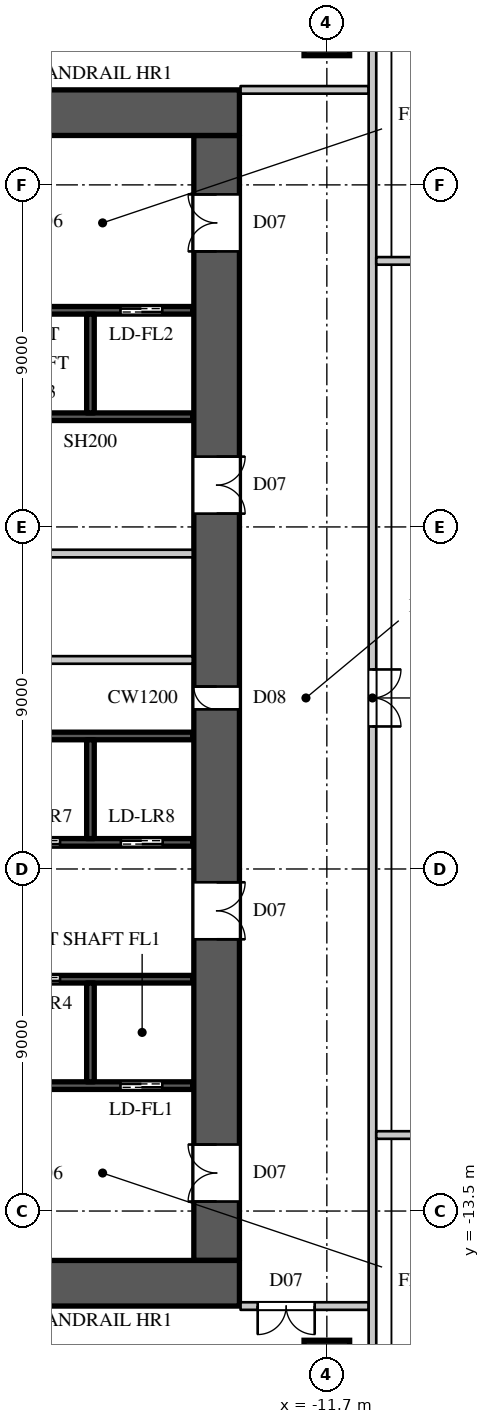
"""IFC4 building model, lengths in metres.
Left out: names, types, materials, properties, quantities, classifications, styles, units other than length and angle.
Written with IfcOpenShell. Run it as: python <this file> out.ifc"""

import sys

from ifc_helpers import new_model, si_unit, direction, frame, frame_2d, origin, origin_2d, place, context, subcontext, project, spatial, rectangle, circle, extrude, element, fill, save


model = new_model("IFC4")
c1 = context("Model", 3, precision=1e-05, world=origin(), true_north=direction((0.0, 1.0)))
c2 = subcontext(c1, "Body", "Model", "MODEL_VIEW")
j1 = project(units=[si_unit("LENGTHUNIT", "METRE"), si_unit("PLANEANGLEUNIT", "RADIAN")], contexts=[c1])
p1 = place(None, origin())
s1 = spatial("IfcSite", under=j1, at=p1, CompositionType="ELEMENT")
p2 = place(p1, origin())
s2 = spatial("IfcBuilding", under=s1, at=p2, CompositionType="ELEMENT")
p3 = place(p2, frame((0.0, 0.0, 36.0)))
s3 = spatial("IfcBuildingStorey", under=s2, at=p3, CompositionType="ELEMENT", Elevation=36.0)
for number, where, z_axis, x_axis in (
    (1, (-11.7, -17.5, 0.0), (0.0, 0.0, 1.0), (1.0, 0.0, 0.0)),
    (2, (-11.7, 17.5, 0.0), (0.0, 0.0, 1.0), (1.0, 0.0, 0.0)),
):
    element("IfcColumn", number, at=place(p3, frame(where, z_axis=z_axis, x_axis=x_axis)), inside=s3, PredefinedType="COLUMN", context=c2, shape_type="SweptSolid", body=[
        extrude(circle(Radius=0.6, at=origin_2d()), origin(), (0.0, 0.0, 1.0), 8.0),
    ])
for number, where, z_axis, x_axis in (
    (3, (-30.0, 15.4, 0.0), (0.0, 0.0, 1.0), (1.0, 0.0, 0.0)),
    (4, (-30.0, -15.4, 0.0), (0.0, 0.0, 1.0), (1.0, 0.0, 0.0)),
):
    element("IfcWall", number, at=place(p3, frame(where, z_axis=z_axis, x_axis=x_axis)), inside=s3, PredefinedType="SHEAR", context=c2, shape_type="SweptSolid", body=[
        extrude(rectangle(XDim=16.0, YDim=1.2, at=frame_2d((8.0, 0.0))), origin(), (0.0, 0.0, 1.0), 8.0),
    ])
p4 = place(p3, frame((-14.6, -14.8, 0.0), z_axis=(0.0, 0.0, 1.0), x_axis=(0.0, 1.0, 0.0)))
e5 = element("IfcWall", 5, at=p4, inside=s3, PredefinedType="SHEAR", context=c2, shape_type="SweptSolid", body=[
    extrude(rectangle(XDim=29.6, YDim=1.2, at=frame_2d((14.8, 0.0))), origin(), (0.0, 0.0, 1.0), 8.0),
])
p5 = place(p4, frame((1.55, 0.0, 0.0)))
e6 = element("IfcOpeningElement", 6, at=p5, cuts=e5, PredefinedType="OPENING", context=c2, shape_type="SweptSolid", body=[
    extrude(rectangle(XDim=1.5, YDim=2.4, at=frame_2d((0.75, 1.2))), frame((0.0, 0.61, 0.0), z_axis=(0.0, -1.0, 0.0), x_axis=(1.0, 0.0, 0.0)), (0.0, 0.0, 1.0), 1.22),
])
p6 = place(p4, frame((26.55, 0.0, 0.0)))
e7 = element("IfcOpeningElement", 7, at=p6, cuts=e5, PredefinedType="OPENING", context=c2, shape_type="SweptSolid", body=[
    extrude(rectangle(XDim=1.5, YDim=2.4, at=frame_2d((0.75, 1.2))), frame((0.0, 0.61, 0.0), z_axis=(0.0, -1.0, 0.0), x_axis=(1.0, 0.0, 0.0)), (0.0, 0.0, 1.0), 1.22),
])
p7 = place(p4, frame((8.45, 0.0, 0.0)))
e8 = element("IfcOpeningElement", 8, at=p7, cuts=e5, PredefinedType="OPENING", context=c2, shape_type="SweptSolid", body=[
    extrude(rectangle(XDim=1.5, YDim=2.4, at=frame_2d((0.75, 1.2))), frame((0.0, 0.61, 0.0), z_axis=(0.0, -1.0, 0.0), x_axis=(1.0, 0.0, 0.0)), (0.0, 0.0, 1.0), 1.22),
])
p8 = place(p4, frame((19.65, 0.0, 0.0)))
e9 = element("IfcOpeningElement", 9, at=p8, cuts=e5, PredefinedType="OPENING", context=c2, shape_type="SweptSolid", body=[
    extrude(rectangle(XDim=1.5, YDim=2.4, at=frame_2d((0.75, 1.2))), frame((0.0, 0.61, 0.0), z_axis=(0.0, -1.0, 0.0), x_axis=(1.0, 0.0, 0.0)), (0.0, 0.0, 1.0), 1.22),
])
p9 = place(p4, frame((14.5, 0.0, 0.0)))
e10 = element("IfcOpeningElement", 10, at=p9, cuts=e5, PredefinedType="OPENING", context=c2, shape_type="SweptSolid", body=[
    extrude(rectangle(XDim=0.6, YDim=2.0, at=frame_2d((0.3, 1.0))), frame((0.0, 0.61, 0.0), z_axis=(0.0, -1.0, 0.0), x_axis=(1.0, 0.0, 0.0)), (0.0, 0.0, 1.0), 1.22),
])
p10 = place(p3, frame((-26.1, 3.8, 0.0), z_axis=(0.0, 0.0, 1.0), x_axis=(1.0, 0.0, 0.0)))
e11 = element("IfcWall", 11, at=p10, inside=s3, PredefinedType="PARTITIONING", context=c2, shape_type="SweptSolid", body=[
    extrude(rectangle(XDim=10.87, YDim=0.2, at=frame_2d((5.435, 0.0))), origin(), (0.0, 0.0, 1.0), 7.598),
])
p11 = place(p10, frame((4.95, 0.0, 0.0)))
e12 = element("IfcOpeningElement", 12, at=p11, cuts=e11, PredefinedType="OPENING", context=c2, shape_type="SweptSolid", body=[
    extrude(rectangle(XDim=0.9, YDim=2.2, at=frame_2d((0.45, 1.1))), frame((0.0, 0.11, 0.0), z_axis=(0.0, -1.0, 0.0), x_axis=(1.0, 0.0, 0.0)), (0.0, 0.0, 1.0), 0.22),
])
p12 = place(p3, frame((-13.97, -16.0, 0.0), z_axis=(0.0, 0.0, 1.0), x_axis=(1.0, 0.0, 0.0)))
e13 = element("IfcWall", 13, at=p12, inside=s3, PredefinedType="PARTITIONING", context=c2, shape_type="SweptSolid", body=[
    extrude(rectangle(XDim=3.37, YDim=0.2, at=frame_2d((1.685, 0.0))), origin(), (0.0, 0.0, 1.0), 7.598),
])
p13 = place(p12, frame((0.45, 0.0, 0.0)))
e14 = element("IfcOpeningElement", 14, at=p13, cuts=e13, PredefinedType="OPENING", context=c2, shape_type="SweptSolid", body=[
    extrude(rectangle(XDim=1.5, YDim=2.4, at=frame_2d((0.75, 1.2))), frame((0.0, 0.11, 0.0), z_axis=(0.0, -1.0, 0.0), x_axis=(1.0, 0.0, 0.0)), (0.0, 0.0, 1.0), 0.22),
])
p14 = place(p3, frame((-13.97, 16.0, 0.0), z_axis=(0.0, 0.0, 1.0), x_axis=(1.0, 0.0, 0.0)))
e15 = element("IfcWall", 15, at=p14, inside=s3, PredefinedType="PARTITIONING", context=c2, shape_type="SweptSolid", body=[
    extrude(rectangle(XDim=3.37, YDim=0.2, at=frame_2d((1.685, 0.0))), origin(), (0.0, 0.0, 1.0), 7.598),
])
p15 = place(p3, frame((-10.5, -18.9, 0.0), z_axis=(0.0, 0.0, 1.0), x_axis=(0.0, 1.0, 0.0)))
e16 = element("IfcWall", 16, at=p15, inside=s3, PredefinedType="PARTITIONING", context=c2, shape_type="SweptSolid", body=[
    extrude(rectangle(XDim=37.8, YDim=0.2, at=frame_2d((18.9, 0.0))), origin(), (0.0, 0.0, 1.0), 7.598),
])
p16 = place(p15, frame((18.15, 0.0, 0.0)))
e17 = element("IfcOpeningElement", 17, at=p16, cuts=e16, PredefinedType="OPENING", context=c2, shape_type="SweptSolid", body=[
    extrude(rectangle(XDim=1.5, YDim=2.4, at=frame_2d((0.75, 1.2))), frame((0.0, 0.11, 0.0), z_axis=(0.0, -1.0, 0.0), x_axis=(1.0, 0.0, 0.0)), (0.0, 0.0, 1.0), 0.22),
])
p17 = place(p3, frame((-10.4, -11.5, 0.0), z_axis=(0.0, 0.0, 1.0), x_axis=(1.0, 0.0, 0.0)))
e18 = element("IfcWall", 18, at=p17, inside=s3, PredefinedType="PARTITIONING", context=c2, shape_type="SweptSolid", body=[
    extrude(rectangle(XDim=24.8, YDim=0.2, at=frame_2d((12.4, 0.0))), origin(), (0.0, 0.0, 1.0), 7.598),
])
p18 = place(p17, frame((5.5, 0.0, 0.0)))
e19 = element("IfcOpeningElement", 19, at=p18, cuts=e18, PredefinedType="OPENING", context=c2, shape_type="SweptSolid", body=[
    extrude(rectangle(XDim=1.5, YDim=2.2, at=frame_2d((0.75, 1.1))), frame((0.0, 0.11, 0.0), z_axis=(0.0, -1.0, 0.0), x_axis=(1.0, 0.0, 0.0)), (0.0, 0.0, 1.0), 0.22),
])
p19 = place(p17, frame((17.6, 0.0, 0.0)))
e20 = element("IfcOpeningElement", 20, at=p19, cuts=e18, PredefinedType="OPENING", context=c2, shape_type="SweptSolid", body=[
    extrude(rectangle(XDim=1.5, YDim=2.2, at=frame_2d((0.75, 1.1))), frame((0.0, 0.11, 0.0), z_axis=(0.0, -1.0, 0.0), x_axis=(1.0, 0.0, 0.0)), (0.0, 0.0, 1.0), 0.22),
])
p20 = place(p3, frame((-10.4, 11.5, 0.0), z_axis=(0.0, 0.0, 1.0), x_axis=(1.0, 0.0, 0.0)))
e21 = element("IfcWall", 21, at=p20, inside=s3, PredefinedType="PARTITIONING", context=c2, shape_type="SweptSolid", body=[
    extrude(rectangle(XDim=24.8, YDim=0.2, at=frame_2d((12.4, 0.0))), origin(), (0.0, 0.0, 1.0), 7.598),
])
p21 = place(p20, frame((3.7, 0.0, 0.0)))
e22 = element("IfcOpeningElement", 22, at=p21, cuts=e21, PredefinedType="OPENING", context=c2, shape_type="SweptSolid", body=[
    extrude(rectangle(XDim=1.5, YDim=2.2, at=frame_2d((0.75, 1.1))), frame((0.0, 0.11, 0.0), z_axis=(0.0, -1.0, 0.0), x_axis=(1.0, 0.0, 0.0)), (0.0, 0.0, 1.0), 0.22),
])
p22 = place(p20, frame((11.7, 0.0, 0.0)))
e23 = element("IfcOpeningElement", 23, at=p22, cuts=e21, PredefinedType="OPENING", context=c2, shape_type="SweptSolid", body=[
    extrude(rectangle(XDim=1.5, YDim=2.2, at=frame_2d((0.75, 1.1))), frame((0.0, 0.11, 0.0), z_axis=(0.0, -1.0, 0.0), x_axis=(1.0, 0.0, 0.0)), (0.0, 0.0, 1.0), 0.22),
])
p23 = place(p20, frame((19.9, 0.0, 0.0)))
e24 = element("IfcOpeningElement", 24, at=p23, cuts=e21, PredefinedType="OPENING", context=c2, shape_type="SweptSolid", body=[
    extrude(rectangle(XDim=1.5, YDim=2.2, at=frame_2d((0.75, 1.1))), frame((0.0, 0.11, 0.0), z_axis=(0.0, -1.0, 0.0), x_axis=(1.0, 0.0, 0.0)), (0.0, 0.0, 1.0), 0.22),
])
p24 = place(p3, frame((-26.1, 1.0, 0.0), z_axis=(0.0, 0.0, 1.0), x_axis=(1.0, 0.0, 0.0)))
e25 = element("IfcWall", 25, at=p24, inside=s3, PredefinedType="PARTITIONING", context=c2, shape_type="SweptSolid", body=[
    extrude(rectangle(XDim=10.87, YDim=0.2, at=frame_2d((5.435, 0.0))), origin(), (0.0, 0.0, 1.0), 7.598),
])
p25 = place(p3, frame((-28.77, -7.4, 0.0), z_axis=(0.0, 0.0, 1.0), x_axis=(1.0, 0.0, 0.0)))
e26 = element("IfcWall", 26, at=p25, inside=s3, PredefinedType="SHEAR", context=c2, shape_type="SweptSolid", body=[
    extrude(rectangle(XDim=13.54, YDim=0.2, at=frame_2d((6.77, 0.0))), origin(), (0.0, 0.0, 1.0), 7.598),
])
p26 = place(p25, frame((0.8, 0.0, 0.0)))
e27 = element("IfcOpeningElement", 27, at=p26, cuts=e26, PredefinedType="OPENING", context=c2, shape_type="SweptSolid", body=[
    extrude(rectangle(XDim=1.1, YDim=2.2, at=frame_2d((0.55, 1.1))), frame((0.0, 0.11, 0.0), z_axis=(0.0, -1.0, 0.0), x_axis=(1.0, 0.0, 0.0)), (0.0, 0.0, 1.0), 0.22),
])
p27 = place(p25, frame((3.5, 0.0, 0.0)))
e28 = element("IfcOpeningElement", 28, at=p27, cuts=e26, PredefinedType="OPENING", context=c2, shape_type="SweptSolid", body=[
    extrude(rectangle(XDim=1.1, YDim=2.2, at=frame_2d((0.55, 1.1))), frame((0.0, 0.11, 0.0), z_axis=(0.0, -1.0, 0.0), x_axis=(1.0, 0.0, 0.0)), (0.0, 0.0, 1.0), 0.22),
])
p28 = place(p25, frame((6.2, 0.0, 0.0)))
e29 = element("IfcOpeningElement", 29, at=p28, cuts=e26, PredefinedType="OPENING", context=c2, shape_type="SweptSolid", body=[
    extrude(rectangle(XDim=1.1, YDim=2.2, at=frame_2d((0.55, 1.1))), frame((0.0, 0.11, 0.0), z_axis=(0.0, -1.0, 0.0), x_axis=(1.0, 0.0, 0.0)), (0.0, 0.0, 1.0), 0.22),
])
p29 = place(p25, frame((8.95, 0.0, 0.0)))
e30 = element("IfcOpeningElement", 30, at=p29, cuts=e26, PredefinedType="OPENING", context=c2, shape_type="SweptSolid", body=[
    extrude(rectangle(XDim=1.1, YDim=2.2, at=frame_2d((0.55, 1.1))), frame((0.0, 0.11, 0.0), z_axis=(0.0, -1.0, 0.0), x_axis=(1.0, 0.0, 0.0)), (0.0, 0.0, 1.0), 0.22),
])
p30 = place(p3, frame((-28.77, -3.8, 0.0), z_axis=(0.0, 0.0, 1.0), x_axis=(1.0, 0.0, 0.0)))
e31 = element("IfcWall", 31, at=p30, inside=s3, PredefinedType="SHEAR", context=c2, shape_type="SweptSolid", body=[
    extrude(rectangle(XDim=13.54, YDim=0.2, at=frame_2d((6.77, 0.0))), origin(), (0.0, 0.0, 1.0), 7.598),
])
p31 = place(p30, frame((3.5, 0.0, 0.0)))
e32 = element("IfcOpeningElement", 32, at=p31, cuts=e31, PredefinedType="OPENING", context=c2, shape_type="SweptSolid", body=[
    extrude(rectangle(XDim=1.1, YDim=2.2, at=frame_2d((0.55, 1.1))), frame((0.0, 0.11, 0.0), z_axis=(0.0, -1.0, 0.0), x_axis=(1.0, 0.0, 0.0)), (0.0, 0.0, 1.0), 0.22),
])
p32 = place(p30, frame((6.2, 0.0, 0.0)))
e33 = element("IfcOpeningElement", 33, at=p32, cuts=e31, PredefinedType="OPENING", context=c2, shape_type="SweptSolid", body=[
    extrude(rectangle(XDim=1.1, YDim=2.2, at=frame_2d((0.55, 1.1))), frame((0.0, 0.11, 0.0), z_axis=(0.0, -1.0, 0.0), x_axis=(1.0, 0.0, 0.0)), (0.0, 0.0, 1.0), 0.22),
])
p33 = place(p30, frame((8.95, 0.0, 0.0)))
e34 = element("IfcOpeningElement", 34, at=p33, cuts=e31, PredefinedType="OPENING", context=c2, shape_type="SweptSolid", body=[
    extrude(rectangle(XDim=1.1, YDim=2.2, at=frame_2d((0.55, 1.1))), frame((0.0, 0.11, 0.0), z_axis=(0.0, -1.0, 0.0), x_axis=(1.0, 0.0, 0.0)), (0.0, 0.0, 1.0), 0.22),
])
p34 = place(p30, frame((11.65, 0.0, 0.0)))
e35 = element("IfcOpeningElement", 35, at=p34, cuts=e31, PredefinedType="OPENING", context=c2, shape_type="SweptSolid", body=[
    extrude(rectangle(XDim=1.1, YDim=2.2, at=frame_2d((0.55, 1.1))), frame((0.0, 0.11, 0.0), z_axis=(0.0, -1.0, 0.0), x_axis=(1.0, 0.0, 0.0)), (0.0, 0.0, 1.0), 0.22),
])
p35 = place(p3, frame((-28.77, -1.0, 0.0), z_axis=(0.0, 0.0, 1.0), x_axis=(1.0, 0.0, 0.0)))
e36 = element("IfcWall", 36, at=p35, inside=s3, PredefinedType="SHEAR", context=c2, shape_type="SweptSolid", body=[
    extrude(rectangle(XDim=13.54, YDim=0.2, at=frame_2d((6.77, 0.0))), origin(), (0.0, 0.0, 1.0), 7.598),
])
p36 = place(p3, frame((-20.62, 7.4, 0.0), z_axis=(0.0, 0.0, 1.0), x_axis=(1.0, 0.0, 0.0)))
e37 = element("IfcWall", 37, at=p36, inside=s3, PredefinedType="SHEAR", context=c2, shape_type="SweptSolid", body=[
    extrude(rectangle(XDim=5.39, YDim=0.2, at=frame_2d((2.695, 0.0))), origin(), (0.0, 0.0, 1.0), 7.598),
])
p37 = place(p3, frame((-19.98, -10.2, 0.0), z_axis=(0.0, 0.0, 1.0), x_axis=(1.0, 0.0, 0.0)))
e38 = element("IfcWall", 38, at=p37, inside=s3, PredefinedType="SHEAR", context=c2, shape_type="SweptSolid", body=[
    extrude(rectangle(XDim=4.75, YDim=0.2, at=frame_2d((2.375, 0.0))), origin(), (0.0, 0.0, 1.0), 7.598),
])
p38 = place(p37, frame((2.85, 0.0, 0.0)))
e39 = element("IfcOpeningElement", 39, at=p38, cuts=e38, PredefinedType="OPENING", context=c2, shape_type="SweptSolid", body=[
    extrude(rectangle(XDim=1.1, YDim=2.2, at=frame_2d((0.55, 1.1))), frame((0.0, 0.11, 0.0), z_axis=(0.0, -1.0, 0.0), x_axis=(1.0, 0.0, 0.0)), (0.0, 0.0, 1.0), 0.22),
])
p39 = place(p3, frame((-19.98, 10.2, 0.0), z_axis=(0.0, 0.0, 1.0), x_axis=(1.0, 0.0, 0.0)))
e40 = element("IfcWall", 40, at=p39, inside=s3, PredefinedType="SHEAR", context=c2, shape_type="SweptSolid", body=[
    extrude(rectangle(XDim=4.75, YDim=0.2, at=frame_2d((2.375, 0.0))), origin(), (0.0, 0.0, 1.0), 7.598),
])
p40 = place(p39, frame((2.85, 0.0, 0.0)))
e41 = element("IfcOpeningElement", 41, at=p40, cuts=e40, PredefinedType="OPENING", context=c2, shape_type="SweptSolid", body=[
    extrude(rectangle(XDim=1.1, YDim=2.2, at=frame_2d((0.55, 1.1))), frame((0.0, 0.11, 0.0), z_axis=(0.0, -1.0, 0.0), x_axis=(1.0, 0.0, 0.0)), (0.0, 0.0, 1.0), 0.22),
])
p41 = place(p3, frame((-17.92, -10.1, 0.0), z_axis=(0.0, 0.0, 1.0), x_axis=(0.0, 1.0, 0.0)))
e42 = element("IfcWall", 42, at=p41, inside=s3, PredefinedType="SHEAR", context=c2, shape_type="SweptSolid", body=[
    extrude(rectangle(XDim=2.6, YDim=0.2, at=frame_2d((1.3, 0.0))), origin(), (0.0, 0.0, 1.0), 8.0),
])
p42 = place(p3, frame((-17.92, -3.7, 0.0), z_axis=(0.0, 0.0, 1.0), x_axis=(0.0, 1.0, 0.0)))
e43 = element("IfcWall", 43, at=p42, inside=s3, PredefinedType="SHEAR", context=c2, shape_type="SweptSolid", body=[
    extrude(rectangle(XDim=2.6, YDim=0.2, at=frame_2d((1.3, 0.0))), origin(), (0.0, 0.0, 1.0), 8.0),
])
p43 = place(p3, frame((-17.92, 7.5, 0.0), z_axis=(0.0, 0.0, 1.0), x_axis=(0.0, 1.0, 0.0)))
e44 = element("IfcWall", 44, at=p43, inside=s3, PredefinedType="SHEAR", context=c2, shape_type="SweptSolid", body=[
    extrude(rectangle(XDim=2.6, YDim=0.2, at=frame_2d((1.3, 0.0))), origin(), (0.0, 0.0, 1.0), 8.0),
])
p44 = place(p29, origin())
e45 = element("IfcDoor", 45, at=p44, inside=s3, OperationType="DOUBLE_DOOR_SLIDING", PredefinedType="DOOR", context=c2, shape_type="SweptSolid", body=[
    extrude(rectangle(XDim=1.1, YDim=2.2, at=frame_2d((0.55, 1.1))), frame((0.0, 0.025, 0.0), z_axis=(0.0, -1.0, 0.0), x_axis=(1.0, 0.0, 0.0)), (0.0, 0.0, 1.0), 0.05),
])
fill(e30, e45)
p45 = place(p38, origin())
e46 = element("IfcDoor", 46, at=p45, inside=s3, OperationType="DOUBLE_DOOR_SLIDING", PredefinedType="DOOR", context=c2, shape_type="SweptSolid", body=[
    extrude(rectangle(XDim=1.1, YDim=2.2, at=frame_2d((0.55, 1.1))), frame((0.0, 0.025, 0.0), z_axis=(0.0, -1.0, 0.0), x_axis=(1.0, 0.0, 0.0)), (0.0, 0.0, 1.0), 0.05),
])
fill(e39, e46)
p46 = place(p33, origin())
e47 = element("IfcDoor", 47, at=p46, inside=s3, OperationType="DOUBLE_DOOR_SLIDING", PredefinedType="DOOR", context=c2, shape_type="SweptSolid", body=[
    extrude(rectangle(XDim=1.1, YDim=2.2, at=frame_2d((0.55, 1.1))), frame((0.0, 0.025, 0.0), z_axis=(0.0, -1.0, 0.0), x_axis=(1.0, 0.0, 0.0)), (0.0, 0.0, 1.0), 0.05),
])
fill(e34, e47)
p47 = place(p34, origin())
e48 = element("IfcDoor", 48, at=p47, inside=s3, OperationType="DOUBLE_DOOR_SLIDING", PredefinedType="DOOR", context=c2, shape_type="SweptSolid", body=[
    extrude(rectangle(XDim=1.1, YDim=2.2, at=frame_2d((0.55, 1.1))), frame((0.0, 0.025, 0.0), z_axis=(0.0, -1.0, 0.0), x_axis=(1.0, 0.0, 0.0)), (0.0, 0.0, 1.0), 0.05),
])
fill(e35, e48)
p48 = place(p40, origin())
e49 = element("IfcDoor", 49, at=p48, inside=s3, OperationType="DOUBLE_DOOR_SLIDING", PredefinedType="DOOR", context=c2, shape_type="SweptSolid", body=[
    extrude(rectangle(XDim=1.1, YDim=2.2, at=frame_2d((0.55, 1.1))), frame((0.0, 0.025, 0.0), z_axis=(0.0, -1.0, 0.0), x_axis=(1.0, 0.0, 0.0)), (0.0, 0.0, 1.0), 0.05),
])
fill(e41, e49)
p49 = place(p13, origin())
e50 = element("IfcDoor", 50, at=p49, inside=s3, OperationType="DOUBLE_DOOR_SINGLE_SWING", PredefinedType="DOOR", context=c2, shape_type="SweptSolid", body=[
    extrude(rectangle(XDim=1.5, YDim=2.4, at=frame_2d((0.75, 1.2))), frame((0.0, 0.025, 0.0), z_axis=(0.0, -1.0, 0.0), x_axis=(1.0, 0.0, 0.0)), (0.0, 0.0, 1.0), 0.05),
])
fill(e14, e50)
p50 = place(p16, origin())
e51 = element("IfcDoor", 51, at=p50, inside=s3, OperationType="DOUBLE_DOOR_SINGLE_SWING", PredefinedType="DOOR", context=c2, shape_type="SweptSolid", body=[
    extrude(rectangle(XDim=1.5, YDim=2.4, at=frame_2d((0.75, 1.2))), frame((0.0, 0.025, 0.0), z_axis=(0.0, -1.0, 0.0), x_axis=(1.0, 0.0, 0.0)), (0.0, 0.0, 1.0), 0.05),
])
fill(e17, e51)
p51 = place(p5, origin())
e52 = element("IfcDoor", 52, at=p51, inside=s3, OperationType="DOUBLE_DOOR_SINGLE_SWING", PredefinedType="DOOR", context=c2, shape_type="SweptSolid", body=[
    extrude(rectangle(XDim=1.5, YDim=2.4, at=frame_2d((0.75, 1.2))), frame((0.0, 0.025, 0.0), z_axis=(0.0, -1.0, 0.0), x_axis=(1.0, 0.0, 0.0)), (0.0, 0.0, 1.0), 0.05),
])
fill(e6, e52)
p52 = place(p6, origin())
e53 = element("IfcDoor", 53, at=p52, inside=s3, OperationType="DOUBLE_DOOR_SINGLE_SWING", PredefinedType="DOOR", context=c2, shape_type="SweptSolid", body=[
    extrude(rectangle(XDim=1.5, YDim=2.4, at=frame_2d((0.75, 1.2))), frame((0.0, 0.025, 0.0), z_axis=(0.0, -1.0, 0.0), x_axis=(1.0, 0.0, 0.0)), (0.0, 0.0, 1.0), 0.05),
])
fill(e7, e53)
p53 = place(p7, origin())
e54 = element("IfcDoor", 54, at=p53, inside=s3, OperationType="DOUBLE_DOOR_SINGLE_SWING", PredefinedType="DOOR", context=c2, shape_type="SweptSolid", body=[
    extrude(rectangle(XDim=1.5, YDim=2.4, at=frame_2d((0.75, 1.2))), frame((0.0, 0.025, 0.0), z_axis=(0.0, -1.0, 0.0), x_axis=(1.0, 0.0, 0.0)), (0.0, 0.0, 1.0), 0.05),
])
fill(e8, e54)
p54 = place(p8, origin())
e55 = element("IfcDoor", 55, at=p54, inside=s3, OperationType="DOUBLE_DOOR_SINGLE_SWING", PredefinedType="DOOR", context=c2, shape_type="SweptSolid", body=[
    extrude(rectangle(XDim=1.5, YDim=2.4, at=frame_2d((0.75, 1.2))), frame((0.0, 0.025, 0.0), z_axis=(0.0, -1.0, 0.0), x_axis=(1.0, 0.0, 0.0)), (0.0, 0.0, 1.0), 0.05),
])
fill(e9, e55)
p55 = place(p9, origin())
e56 = element("IfcDoor", 56, at=p55, inside=s3, OperationType="SINGLE_SWING_RIGHT", PredefinedType="DOOR", context=c2, shape_type="SweptSolid", body=[
    extrude(rectangle(XDim=0.6, YDim=2.0, at=frame_2d((0.3, 1.0))), frame((0.0, 0.025, 0.0), z_axis=(0.0, -1.0, 0.0), x_axis=(1.0, 0.0, 0.0)), (0.0, 0.0, 1.0), 0.05),
])
fill(e10, e56)
save(model, sys.argv[1])
